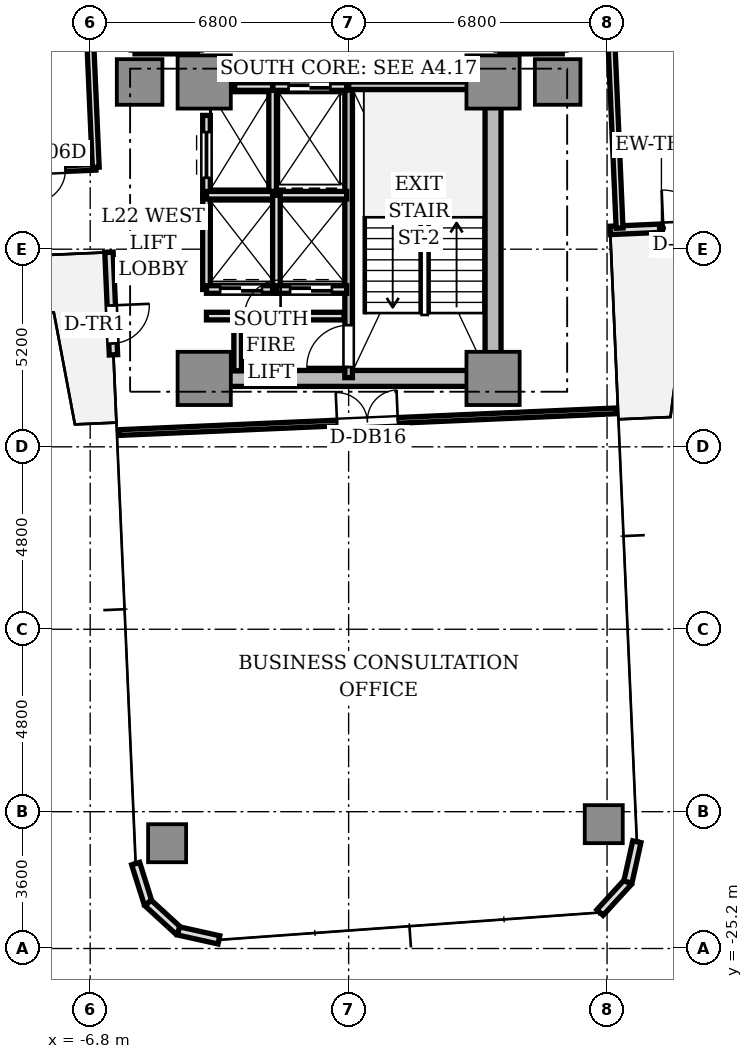
"""IFC4 building model, lengths in metres.
Left out: names, types, materials, properties, quantities, classifications, styles, units other than length and angle.
Written with IfcOpenShell. Run it as: python <this file> out.ifc"""

import sys

from ifc_helpers import new_model, si_unit, direction, frame, frame_2d, origin, origin_2d, place, context, subcontext, project, spatial, rectangle, extrude, source, transform, mapped, element, fill, save


model = new_model("IFC4")
c1 = context("Model", 3, precision=1e-05, world=origin(), true_north=direction((0.0, 1.0)))
c2 = subcontext(c1, "Body", "Model", "MODEL_VIEW")
j1 = project(units=[si_unit("LENGTHUNIT", "METRE"), si_unit("PLANEANGLEUNIT", "RADIAN")], contexts=[c1])
p1 = place(None, origin())
s1 = spatial("IfcSite", under=j1, at=p1, CompositionType="ELEMENT")
p2 = place(p1, origin())
s2 = spatial("IfcBuilding", under=s1, at=p2, CompositionType="ELEMENT")
p3 = place(p2, frame((0.0, 0.0, 83.5)))
s3 = spatial("IfcBuildingStorey", under=s2, at=p3, CompositionType="ELEMENT", Elevation=83.5)
p4 = place(p3, frame((-3.55, -10.2, 0.0), z_axis=(0.0, 0.0, 1.0), x_axis=(1.0, 0.0, 0.0)))
e1 = element("IfcWall", 1, at=p4, inside=s3, PredefinedType="SHEAR", context=c2, shape_type="SweptSolid", body=[
    extrude(rectangle(XDim=7.1, YDim=0.42, at=frame_2d((3.55, 0.0))), origin(), (0.0, 0.0, 1.0), 3.11),
])
p5 = place(p3, frame((3.8, -9.75, 0.0), z_axis=(0.0, 0.0, 1.0), x_axis=(0.0, 1.0, 0.0)))
e2 = element("IfcWall", 2, at=p5, inside=s3, PredefinedType="SHEAR", context=c2, shape_type="SweptSolid", body=[
    extrude(rectangle(XDim=6.9, YDim=0.42, at=frame_2d((3.45, 0.0))), origin(), (0.0, 0.0, 1.0), 3.11),
])
m1 = source(origin(), c2, "Body", "SweptSolid", [
    extrude(rectangle(XDim=1.4, YDim=1.4, at=origin_2d()), origin(), (0.0, 0.0, 1.0), 3.11),
])
for number, where, z_axis, x_axis in (
    (3, (-3.8, -2.4, 0.0), (0.0, 0.0, 1.0), (1.0, 0.0, 0.0)),
    (4, (3.8, -2.4, 0.0), (0.0, 0.0, 1.0), (1.0, 0.0, 0.0)),
    (5, (-3.8, -10.2, 0.0), (0.0, 0.0, 1.0), (1.0, 0.0, 0.0)),
    (6, (3.8, -10.2, 0.0), (0.0, 0.0, 1.0), (1.0, 0.0, 0.0)),
):
    element("IfcColumn", number, at=place(p3, frame(where, z_axis=z_axis, x_axis=x_axis)), inside=s3, PredefinedType="COLUMN", context=c2, shape_type="MappedRepresentation", body=[
        mapped(m1, transform((0.0, 0.0, 0.0), scale=1.0)),
    ])
m2 = source(origin(), c2, "Body", "SweptSolid", [
    extrude(rectangle(XDim=1.2, YDim=1.2, at=origin_2d()), origin(), (0.0, 0.0, 1.0), 3.11),
])
for number, where, z_axis, x_axis in (
    (7, (5.5, -2.4, 0.0), (0.0, 0.0, 1.0), (1.0, 0.0, 0.0)),
    (8, (-5.5, -2.4, 0.0), (0.0, 0.0, 1.0), (1.0, 0.0, 0.0)),
):
    element("IfcColumn", number, at=place(p3, frame(where, z_axis=z_axis, x_axis=x_axis)), inside=s3, PredefinedType="COLUMN", context=c2, shape_type="MappedRepresentation", body=[
        mapped(m2, transform((0.0, 0.0, 0.0), scale=1.0)),
    ])
m3 = source(origin(), c2, "Body", "SweptSolid", [
    extrude(rectangle(XDim=1.0, YDim=1.0, at=origin_2d()), origin(), (0.0, 0.0, 1.0), 3.11),
])
for number, where, z_axis, x_axis in (
    (9, (-4.776, -22.43, 0.0), (0.0, 0.0, 1.0), (1.0, 0.0, 0.0)),
    (10, (6.713, -21.928, 0.0), (0.0, 0.0, 1.0), (1.0, 0.0, 0.0)),
):
    element("IfcColumn", number, at=place(p3, frame(where, z_axis=z_axis, x_axis=x_axis)), inside=s3, PredefinedType="COLUMN", context=c2, shape_type="MappedRepresentation", body=[
        mapped(m3, transform((0.0, 0.0, 0.0), scale=1.0)),
    ])
p6 = place(p3, frame((6.882, -6.306, 0.0), z_axis=(0.0, 0.0, 1.0), x_axis=(0.999045894436, 0.043672655174, 0.0)))
e11 = element("IfcWall", 11, at=p6, inside=s3, PredefinedType="STANDARD", context=c2, shape_type="SweptSolid", body=[
    extrude(rectangle(XDim=2.7, YDim=0.22, at=frame_2d((1.35, 0.0))), origin(), (0.0, 0.0, 1.0), 3.11),
])
p7 = place(p6, frame((1.4, 0.0, 0.0)))
e12 = element("IfcOpeningElement", 12, at=p7, cuts=e11, PredefinedType="OPENING", context=c2, shape_type="SweptSolid", body=[
    extrude(rectangle(XDim=1.0, YDim=2.2, at=frame_2d((0.5, 1.1))), frame((0.0, 0.12, 0.0), z_axis=(0.0, -1.0, 0.0), x_axis=(1.0, 0.0, 0.0)), (0.0, 0.0, 1.0), 0.24),
])
p8 = place(p3, frame((-6.306, -6.882, 0.0), z_axis=(0.0, 0.0, 1.0), x_axis=(0.043672655174, -0.999045894436, 0.0)))
e13 = element("IfcWall", 13, at=p8, inside=s3, PredefinedType="STANDARD", context=c2, shape_type="SweptSolid", body=[
    extrude(rectangle(XDim=2.7, YDim=0.22, at=frame_2d((1.35, 0.0))), origin(), (0.0, 0.0, 1.0), 3.11),
])
p9 = place(p8, frame((1.4, 0.0, 0.0)))
e14 = element("IfcOpeningElement", 14, at=p9, cuts=e13, PredefinedType="OPENING", context=c2, shape_type="SweptSolid", body=[
    extrude(rectangle(XDim=1.0, YDim=2.2, at=frame_2d((0.5, 1.1))), frame((0.0, 0.12, 0.0), z_axis=(0.0, -1.0, 0.0), x_axis=(1.0, 0.0, 0.0)), (0.0, 0.0, 1.0), 0.24),
])
p10 = place(p3, frame((-5.604, -22.966, 0.0), z_axis=(0.0, 0.0, 1.0), x_axis=(0.300755105707, -0.953701403161, 0.0)))
e15 = element("IfcWall", 15, at=p10, inside=s3, PredefinedType="STANDARD", context=c2, shape_type="SweptSolid", body=[
    extrude(rectangle(XDim=1.087, YDim=0.22, at=frame_2d((0.543, 0.0))), origin(), (0.0, 0.0, 1.0), 3.11),
])
p11 = place(p3, frame((-5.277, -24.003, 0.0), z_axis=(0.0, 0.0, 1.0), x_axis=(0.737312600672, -0.675551721847, 0.0)))
e16 = element("IfcWall", 16, at=p11, inside=s3, PredefinedType="STANDARD", context=c2, shape_type="SweptSolid", body=[
    extrude(rectangle(XDim=1.087, YDim=0.22, at=frame_2d((0.543, 0.0))), origin(), (0.0, 0.0, 1.0), 3.11),
])
for number, where, z_axis, x_axis in (
    (17, (-4.475, -24.737, 0.0), (0.0, 0.0, 1.0), (0.976, -0.217, 0.0)),
    (18, (6.614, -24.253, 0.0), (0.0, 0.0, 1.0), (0.676, 0.737, 0.0)),
):
    element("IfcWall", number, at=place(p3, frame(where, z_axis=z_axis, x_axis=x_axis)), inside=s3, PredefinedType="STANDARD", context=c2, shape_type="SweptSolid", body=[
        extrude(rectangle(XDim=1.087, YDim=0.22, at=frame_2d((0.543, 0.0))), origin(), (0.0, 0.0, 1.0), 3.11),
    ])
p12 = place(p3, frame((7.349, -23.452, 0.0), z_axis=(0.0, 0.0, 1.0), x_axis=(0.216454939174, 0.976292609471, 0.0)))
e19 = element("IfcWall", 19, at=p12, inside=s3, PredefinedType="STANDARD", context=c2, shape_type="SweptSolid", body=[
    extrude(rectangle(XDim=1.087, YDim=0.22, at=frame_2d((0.544, 0.0))), origin(), (0.0, 0.0, 1.0), 3.11),
])
p13 = place(p3, frame((0.0, -10.18, 0.0), z_axis=(0.0, 0.0, 1.0), x_axis=(0.0, 1.0, 0.0)))
e20 = element("IfcWall", 20, at=p13, inside=s3, PredefinedType="SOLIDWALL", context=c2, shape_type="SweptSolid", body=[
    extrude(rectangle(XDim=7.68, YDim=0.2, at=frame_2d((3.84, 0.0))), origin(), (0.0, 0.0, 1.0), 3.11),
])
p14 = place(p13, frame((0.28, 0.0, 0.0)))
e21 = element("IfcOpeningElement", 21, at=p14, cuts=e20, PredefinedType="OPENING", context=c2, shape_type="SweptSolid", body=[
    extrude(rectangle(XDim=1.1, YDim=2.15, at=frame_2d((0.55, 1.075))), frame((0.0, 0.11, 0.0), z_axis=(0.0, -1.0, 0.0), x_axis=(1.0, 0.0, 0.0)), (0.0, 0.0, 1.0), 0.22),
])
p15 = place(p3, frame((0.0, -2.5, 0.0), z_axis=(0.0, 0.0, 1.0), x_axis=(1.0, 0.0, 0.0)))
e22 = element("IfcWall", 22, at=p15, inside=s3, PredefinedType="SOLIDWALL", context=c2, shape_type="SweptSolid", body=[
    extrude(rectangle(XDim=3.72, YDim=0.2, at=frame_2d((1.86, 0.0))), origin(), (0.0, 0.0, 1.0), 3.11),
])
p16 = place(p3, frame((-2.0, -5.28, 0.0), z_axis=(0.0, 0.0, 1.0), x_axis=(0.0, 1.0, 0.0)))
e23 = element("IfcWall", 23, at=p16, inside=s3, PredefinedType="SOLIDWALL", context=c2, shape_type="SweptSolid", body=[
    extrude(rectangle(XDim=2.78, YDim=0.2, at=frame_2d((1.39, 0.0))), origin(), (0.0, 0.0, 1.0), 2.66),
])
p17 = place(p3, frame((-2.0, -2.52, 0.0), z_axis=(0.0, 0.0, 1.0), x_axis=(1.0, 0.0, 0.0)))
e24 = element("IfcWall", 24, at=p17, inside=s3, PredefinedType="SOLIDWALL", context=c2, shape_type="SweptSolid", body=[
    extrude(rectangle(XDim=1.95, YDim=0.2, at=frame_2d((0.975, 0.0))), origin(), (0.0, 0.0, 1.0), 2.66),
])
p18 = place(p17, frame((0.42, 0.0, 0.0)))
e25 = element("IfcOpeningElement", 25, at=p18, cuts=e24, PredefinedType="OPENING", context=c2, shape_type="SweptSolid", body=[
    extrude(rectangle(XDim=1.1, YDim=2.2, at=frame_2d((0.55, 1.1))), frame((0.0, 0.11, 0.0), z_axis=(0.0, -1.0, 0.0), x_axis=(1.0, 0.0, 0.0)), (0.0, 0.0, 1.0), 0.22),
])
p19 = place(p3, frame((-3.0, -2.52, 0.0), z_axis=(0.0, 0.0, 1.0), x_axis=(1.0, 0.0, 0.0)))
e26 = element("IfcWall", 26, at=p19, inside=s3, PredefinedType="SOLIDWALL", context=c2, shape_type="SweptSolid", body=[
    extrude(rectangle(XDim=1.0, YDim=0.2, at=frame_2d((0.5, 0.0))), origin(), (0.0, 0.0, 1.0), 2.66),
])
p20 = place(p3, frame((-3.74, -5.36, 0.0), z_axis=(0.0, 0.0, 1.0), x_axis=(0.0, 1.0, 0.0)))
e27 = element("IfcWall", 27, at=p20, inside=s3, PredefinedType="SOLIDWALL", context=c2, shape_type="SweptSolid", body=[
    extrude(rectangle(XDim=2.08, YDim=0.2, at=frame_2d((1.04, 0.0))), origin(), (0.0, 0.0, 1.0), 2.66),
])
p21 = place(p20, frame((0.44, 0.0, 0.0)))
e28 = element("IfcOpeningElement", 28, at=p21, cuts=e27, PredefinedType="OPENING", context=c2, shape_type="SweptSolid", body=[
    extrude(rectangle(XDim=1.2, YDim=2.2, at=frame_2d((0.6, 1.1))), frame((0.0, 0.11, 0.0), z_axis=(0.0, -1.0, 0.0), x_axis=(1.0, 0.0, 0.0)), (0.0, 0.0, 1.0), 0.22),
])
p22 = place(p3, frame((-3.74, -7.86, 0.0), z_axis=(0.0, 0.0, 1.0), x_axis=(0.0, 1.0, 0.0)))
e29 = element("IfcWall", 29, at=p22, inside=s3, PredefinedType="SOLIDWALL", context=c2, shape_type="SweptSolid", body=[
    extrude(rectangle(XDim=2.48, YDim=0.2, at=frame_2d((1.24, 0.0))), origin(), (0.0, 0.0, 1.0), 2.66),
])
p23 = place(p3, frame((-3.74, -7.86, 0.0), z_axis=(0.0, 0.0, 1.0), x_axis=(1.0, 0.0, 0.0)))
e30 = element("IfcWall", 30, at=p23, inside=s3, PredefinedType="SOLIDWALL", context=c2, shape_type="SweptSolid", body=[
    extrude(rectangle(XDim=1.84, YDim=0.2, at=frame_2d((0.92, 0.0))), origin(), (0.0, 0.0, 1.0), 2.66),
])
p24 = place(p23, frame((0.36, 0.0, 0.0)))
e31 = element("IfcOpeningElement", 31, at=p24, cuts=e30, PredefinedType="OPENING", context=c2, shape_type="SweptSolid", body=[
    extrude(rectangle(XDim=1.1, YDim=2.2, at=frame_2d((0.55, 1.1))), frame((0.0, 0.11, 0.0), z_axis=(0.0, -1.0, 0.0), x_axis=(1.0, 0.0, 0.0)), (0.0, 0.0, 1.0), 0.22),
])
p25 = place(p3, frame((-3.74, -5.38, 0.0), z_axis=(0.0, 0.0, 1.0), x_axis=(1.0, 0.0, 0.0)))
e32 = element("IfcWall", 32, at=p25, inside=s3, PredefinedType="SOLIDWALL", context=c2, shape_type="SweptSolid", body=[
    extrude(rectangle(XDim=3.69, YDim=0.2, at=frame_2d((1.845, 0.0))), origin(), (0.0, 0.0, 1.0), 2.66),
])
p26 = place(p3, frame((-1.9, -7.86, 0.0), z_axis=(0.0, 0.0, 1.0), x_axis=(0.0, 1.0, 0.0)))
e33 = element("IfcWall", 33, at=p26, inside=s3, PredefinedType="SOLIDWALL", context=c2, shape_type="SweptSolid", body=[
    extrude(rectangle(XDim=2.48, YDim=0.2, at=frame_2d((1.24, 0.0))), origin(), (0.0, 0.0, 1.0), 2.66),
])
p27 = place(p3, frame((-1.9, -7.86, 0.0), z_axis=(0.0, 0.0, 1.0), x_axis=(1.0, 0.0, 0.0)))
e34 = element("IfcWall", 34, at=p27, inside=s3, PredefinedType="SOLIDWALL", context=c2, shape_type="SweptSolid", body=[
    extrude(rectangle(XDim=1.85, YDim=0.2, at=frame_2d((0.925, 0.0))), origin(), (0.0, 0.0, 1.0), 2.66),
])
p28 = place(p27, frame((0.36, 0.0, 0.0)))
e35 = element("IfcOpeningElement", 35, at=p28, cuts=e34, PredefinedType="OPENING", context=c2, shape_type="SweptSolid", body=[
    extrude(rectangle(XDim=1.1, YDim=2.2, at=frame_2d((0.55, 1.1))), frame((0.0, 0.11, 0.0), z_axis=(0.0, -1.0, 0.0), x_axis=(1.0, 0.0, 0.0)), (0.0, 0.0, 1.0), 0.22),
])
for number, where, z_axis, x_axis in (
    (36, (3.98, -1.56, 0.0), (0.0, 0.0, 1.0), (1.0, 0.0, 0.0)),
    (37, (-5.62, -1.56, 0.0), (0.0, 0.0, 1.0), (1.0, 0.0, 0.0)),
):
    element("IfcWall", number, at=place(p3, frame(where, z_axis=z_axis, x_axis=x_axis)), inside=s3, PredefinedType="SOLIDWALL", context=c2, shape_type="SweptSolid", body=[
        extrude(rectangle(XDim=1.64, YDim=0.2, at=frame_2d((0.82, 0.0))), origin(), (0.0, 0.0, 1.0), 2.66),
    ])
p29 = place(p3, frame((-3.74, -8.56, 0.0), z_axis=(0.0, 0.0, 1.0), x_axis=(1.0, 0.0, 0.0)))
e38 = element("IfcWall", 38, at=p29, inside=s3, PredefinedType="SOLIDWALL", context=c2, shape_type="SweptSolid", body=[
    extrude(rectangle(XDim=3.62, YDim=0.2, at=frame_2d((1.81, 0.0))), origin(), (0.0, 0.0, 1.0), 2.66),
])
p30 = place(p29, frame((1.0, 0.0, 0.0)))
e39 = element("IfcOpeningElement", 39, at=p30, cuts=e38, PredefinedType="OPENING", context=c2, shape_type="SweptSolid", body=[
    extrude(rectangle(XDim=0.95, YDim=2.15, at=frame_2d((0.475, 1.075))), frame((0.0, 0.11, 0.0), z_axis=(0.0, -1.0, 0.0), x_axis=(1.0, 0.0, 0.0)), (0.0, 0.0, 1.0), 0.22),
])
p31 = place(p3, frame((-2.92, -10.0, 0.0), z_axis=(0.0, 0.0, 1.0), x_axis=(0.0, 1.0, 0.0)))
e40 = element("IfcWall", 40, at=p31, inside=s3, PredefinedType="SOLIDWALL", context=c2, shape_type="SweptSolid", body=[
    extrude(rectangle(XDim=1.44, YDim=0.2, at=frame_2d((0.72, 0.0))), origin(), (0.0, 0.0, 1.0), 2.66),
])
p32 = place(p3, frame((7.129, -6.245, 0.0), z_axis=(0.0, 0.0, 1.0), x_axis=(-0.043600217373, 0.999049058378, 0.0)))
e41 = element("IfcWall", 41, at=p32, inside=s3, PredefinedType="PARTITIONING", context=c2, shape_type="SweptSolid", body=[
    extrude(rectangle(XDim=7.8, YDim=0.18, at=frame_2d((3.9, 0.0))), origin(), (0.0, 0.0, 1.0), 2.66),
])
p33 = place(p3, frame((-6.654, -4.645, 0.0), z_axis=(0.0, 0.0, 1.0), x_axis=(-0.999048925025, -0.043603272887, 0.0)))
e42 = element("IfcWall", 42, at=p33, inside=s3, PredefinedType="PARTITIONING", context=c2, shape_type="SweptSolid", body=[
    extrude(rectangle(XDim=8.55, YDim=0.15, at=frame_2d((4.275, 0.0))), origin(), (0.0, 0.0, 1.0), 2.63),
])
p34 = place(p33, frame((0.8, 0.0, 0.0)))
e43 = element("IfcOpeningElement", 43, at=p34, cuts=e42, PredefinedType="OPENING", context=c2, shape_type="SweptSolid", body=[
    extrude(rectangle(XDim=0.85, YDim=2.1, at=frame_2d((0.425, 1.05))), frame((0.0, 0.085, 0.0), z_axis=(0.0, -1.0, 0.0), x_axis=(1.0, 0.0, 0.0)), (0.0, 0.0, 1.0), 0.17),
])
p35 = place(p33, frame((4.1, 0.0, 0.0)))
e44 = element("IfcOpeningElement", 44, at=p35, cuts=e42, PredefinedType="OPENING", context=c2, shape_type="SweptSolid", body=[
    extrude(rectangle(XDim=0.85, YDim=2.1, at=frame_2d((0.425, 1.05))), frame((0.0, 0.085, 0.0), z_axis=(0.0, -1.0, 0.0), x_axis=(1.0, 0.0, 0.0)), (0.0, 0.0, 1.0), 0.17),
])
p36 = place(p3, frame((-7.129, 6.245, 0.0), z_axis=(0.0, 0.0, 1.0), x_axis=(0.043608291235, -0.999048705988, 0.0)))
e45 = element("IfcWall", 45, at=p36, inside=s3, PredefinedType="PARTITIONING", context=c2, shape_type="SweptSolid", body=[
    extrude(rectangle(XDim=10.9, YDim=0.18, at=frame_2d((5.45, 0.0))), origin(), (0.0, 0.0, 1.0), 2.66),
])
p37 = place(p3, frame((-6.049, -11.625, 0.0), z_axis=(0.0, 0.0, 1.0), x_axis=(0.999047806124, 0.043628901879, 0.0)))
e46 = element("IfcWall", 46, at=p37, inside=s3, PredefinedType="PARTITIONING", context=c2, shape_type="SweptSolid", body=[
    extrude(rectangle(XDim=13.1, YDim=0.15, at=frame_2d((6.55, 0.0))), origin(), (0.0, 0.0, 1.0), 2.66),
])
p38 = place(p37, frame((5.75, 0.0, 0.0)))
e47 = element("IfcOpeningElement", 47, at=p38, cuts=e46, PredefinedType="OPENING", context=c2, shape_type="SweptSolid", body=[
    extrude(rectangle(XDim=1.6, YDim=2.25, at=frame_2d((0.8, 1.125))), frame((0.0, 0.085, 0.0), z_axis=(0.0, -1.0, 0.0), x_axis=(1.0, 0.0, 0.0)), (0.0, 0.0, 1.0), 0.17),
])
m4 = source(origin(), c2, "Body", "SweptSolid", [
    extrude(rectangle(XDim=1.0, YDim=0.05, at=origin_2d()), origin(), (0.0, 0.0, 1.0), 2.2),
])
p39 = place(p7, frame((0.5, 0.0, 0.0)))
e48 = element("IfcDoor", 48, at=p39, inside=s3, OperationType="SINGLE_SWING_LEFT", PredefinedType="DOOR", context=c2, shape_type="MappedRepresentation", body=[
    mapped(m4, transform((0.0, 0.0, 0.0), scale=1.0)),
])
fill(e12, e48)
p40 = place(p9, frame((0.5, 0.0, 0.0)))
e49 = element("IfcDoor", 49, at=p40, inside=s3, OperationType="SINGLE_SWING_LEFT", PredefinedType="DOOR", context=c2, shape_type="MappedRepresentation", body=[
    mapped(m4, transform((0.0, 0.0, 0.0), scale=1.0)),
])
fill(e14, e49)
m5 = source(origin(), c2, "Body", "SweptSolid", [
    extrude(rectangle(XDim=1.1, YDim=0.05, at=origin_2d()), origin(), (0.0, 0.0, 1.0), 2.2),
])
p41 = place(p18, frame((0.55, 0.0, 0.0)))
e50 = element("IfcDoor", 50, at=p41, inside=s3, OperationType="DOUBLE_DOOR_SLIDING", PredefinedType="DOOR", context=c2, shape_type="MappedRepresentation", body=[
    mapped(m5, transform((0.0, 0.0, 0.0), scale=1.0)),
])
fill(e25, e50)
m6 = source(origin(), c2, "Body", "SweptSolid", [
    extrude(rectangle(XDim=1.2, YDim=0.05, at=origin_2d()), origin(), (0.0, 0.0, 1.0), 2.2),
])
p42 = place(p21, frame((0.6, 0.0, 0.0)))
e51 = element("IfcDoor", 51, at=p42, inside=s3, OperationType="DOUBLE_DOOR_SLIDING", PredefinedType="DOOR", context=c2, shape_type="MappedRepresentation", body=[
    mapped(m6, transform((0.0, 0.0, 0.0), scale=1.0)),
])
fill(e28, e51)
p43 = place(p24, frame((0.55, 0.0, 0.0)))
e52 = element("IfcDoor", 52, at=p43, inside=s3, OperationType="DOUBLE_DOOR_SLIDING", PredefinedType="DOOR", context=c2, shape_type="MappedRepresentation", body=[
    mapped(m5, transform((0.0, 0.0, 0.0), scale=1.0)),
])
fill(e31, e52)
p44 = place(p28, frame((0.55, 0.0, 0.0)))
e53 = element("IfcDoor", 53, at=p44, inside=s3, OperationType="DOUBLE_DOOR_SLIDING", PredefinedType="DOOR", context=c2, shape_type="MappedRepresentation", body=[
    mapped(m5, transform((0.0, 0.0, 0.0), scale=1.0)),
])
fill(e35, e53)
m7 = source(origin(), c2, "Body", "SweptSolid", [
    extrude(rectangle(XDim=1.1, YDim=0.05, at=origin_2d()), origin(), (0.0, 0.0, 1.0), 2.15),
])
p45 = place(p14, frame((0.55, 0.0, 0.0)))
e54 = element("IfcDoor", 54, at=p45, inside=s3, OperationType="SINGLE_SWING_LEFT", PredefinedType="DOOR", context=c2, shape_type="MappedRepresentation", body=[
    mapped(m7, transform((0.0, 0.0, 0.0), scale=1.0)),
])
fill(e21, e54)
m8 = source(origin(), c2, "Body", "SweptSolid", [
    extrude(rectangle(XDim=0.95, YDim=0.05, at=origin_2d()), origin(), (0.0, 0.0, 1.0), 2.15),
])
p46 = place(p30, frame((0.475, 0.0, 0.0)))
e55 = element("IfcDoor", 55, at=p46, inside=s3, OperationType="SINGLE_SWING_RIGHT", PredefinedType="DOOR", context=c2, shape_type="MappedRepresentation", body=[
    mapped(m8, transform((0.0, 0.0, 0.0), scale=1.0)),
])
fill(e39, e55)
m9 = source(origin(), c2, "Body", "SweptSolid", [
    extrude(rectangle(XDim=0.85, YDim=0.05, at=origin_2d()), origin(), (0.0, 0.0, 1.0), 2.1),
])
p47 = place(p34, frame((0.425, 0.0, 0.0)))
e56 = element("IfcDoor", 56, at=p47, inside=s3, OperationType="SINGLE_SWING_RIGHT", PredefinedType="DOOR", context=c2, shape_type="MappedRepresentation", body=[
    mapped(m9, transform((0.0, 0.0, 0.0), scale=1.0)),
])
fill(e43, e56)
m10 = source(origin(), c2, "Body", "SweptSolid", [
    extrude(rectangle(XDim=1.6, YDim=0.05, at=origin_2d()), origin(), (0.0, 0.0, 1.0), 2.25),
])
p48 = place(p38, frame((0.8, 0.0, 0.0)))
e57 = element("IfcDoor", 57, at=p48, inside=s3, OperationType="DOUBLE_DOOR_SINGLE_SWING", PredefinedType="DOOR", context=c2, shape_type="MappedRepresentation", body=[
    mapped(m10, transform((0.0, 0.0, 0.0), scale=1.0)),
])
fill(e47, e57)
save(model, sys.argv[1])
